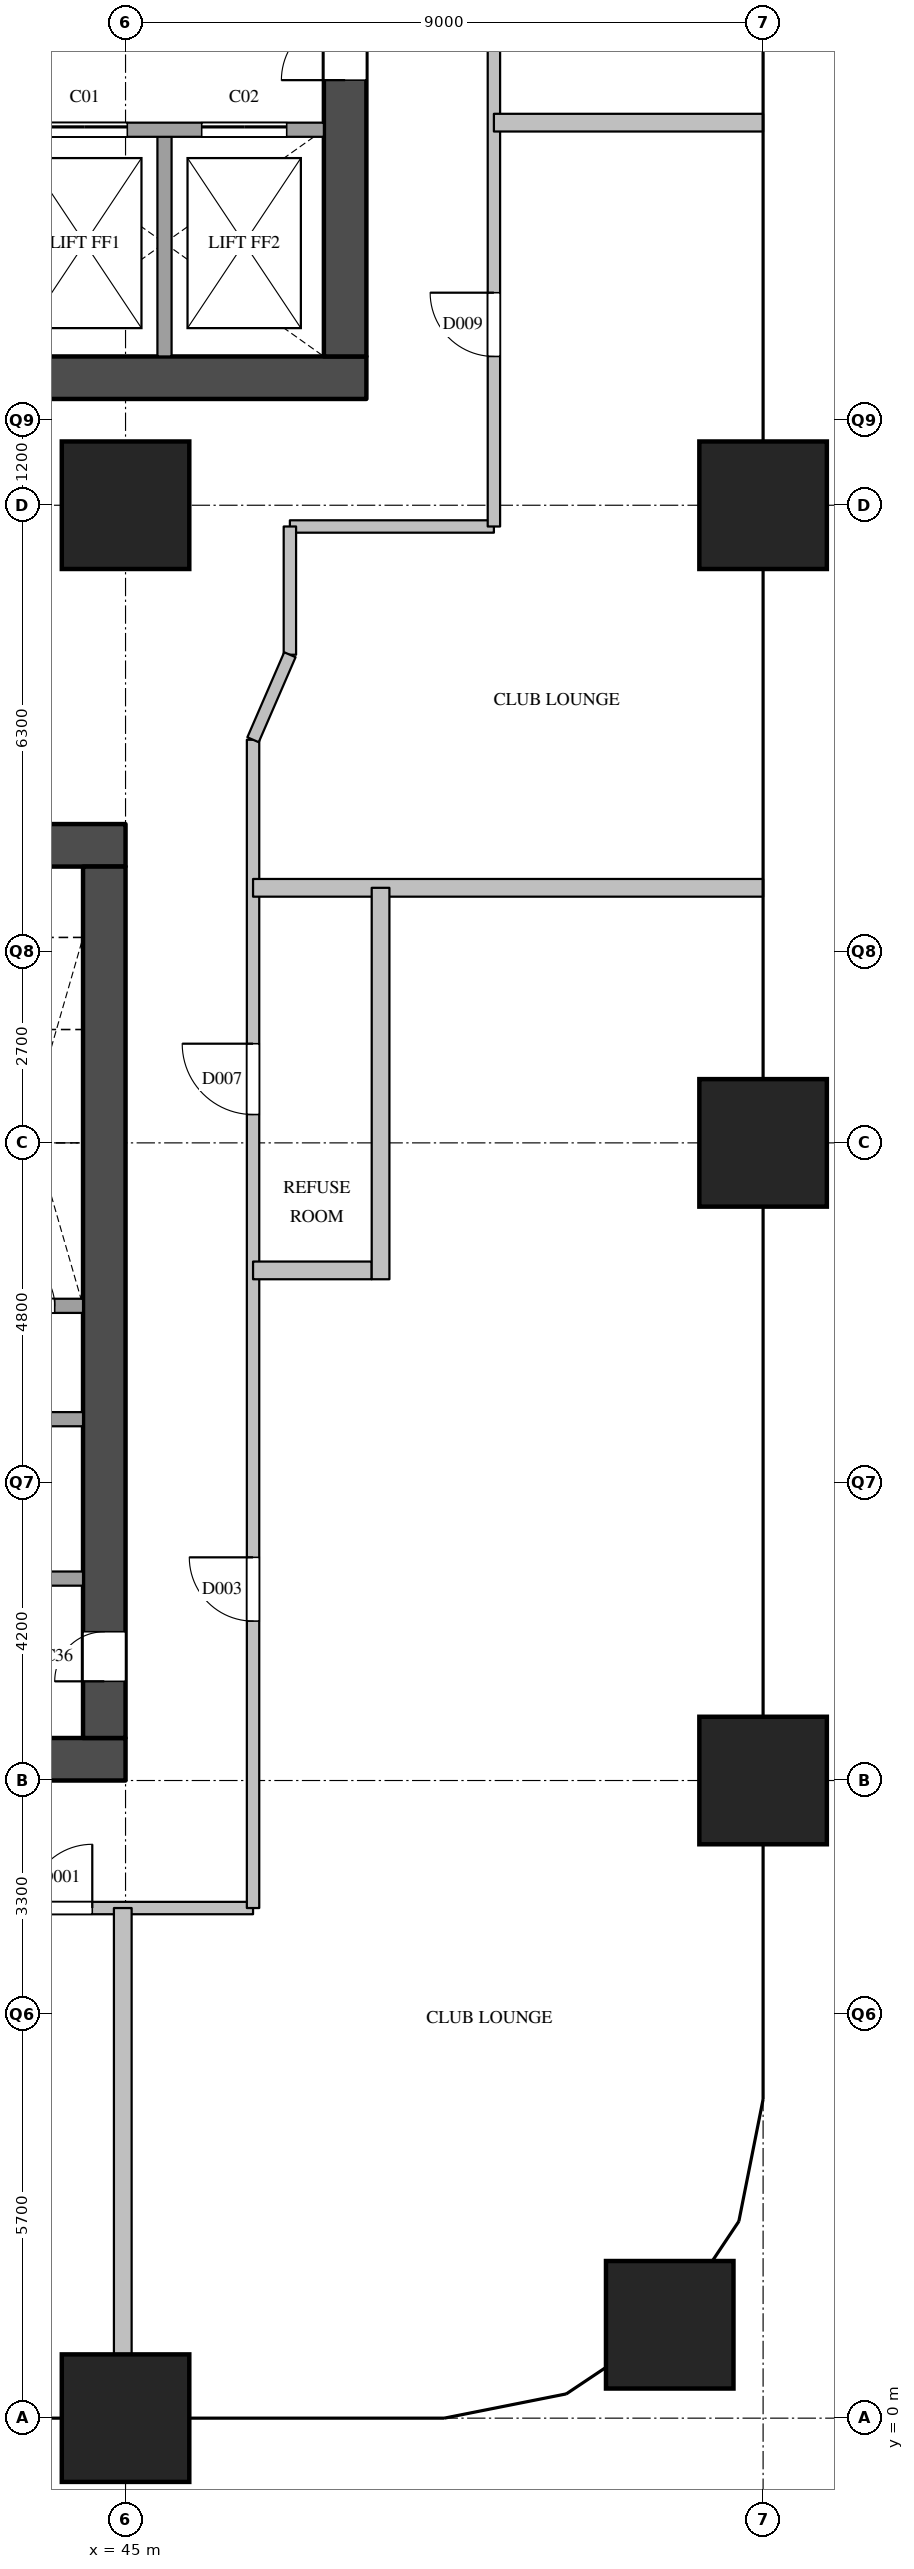
"""IFC4 building model, lengths in metres.
Left out: names, types, materials, properties, quantities, classifications, styles, units other than length and angle.
Written with IfcOpenShell. Run it as: python <this file> out.ifc"""

import sys

from ifc_helpers import new_model, si_unit, direction, frame, frame_2d, origin, origin_2d, place, context, subcontext, project, spatial, rectangle, extrude, element, fill, save


model = new_model("IFC4")
c1 = context("Model", 3, precision=1e-05, world=origin(), true_north=direction((0.0, 1.0)))
c2 = subcontext(c1, "Body", "Model", "MODEL_VIEW")
j1 = project(units=[si_unit("LENGTHUNIT", "METRE"), si_unit("PLANEANGLEUNIT", "RADIAN")], contexts=[c1])
p1 = place(None, origin())
s1 = spatial("IfcSite", under=j1, at=p1, CompositionType="ELEMENT")
p2 = place(p1, origin())
s2 = spatial("IfcBuilding", under=s1, at=p2, CompositionType="ELEMENT")
p3 = place(p2, frame((0.0, 0.0, 89.2)))
s3 = spatial("IfcBuildingStorey", under=s2, at=p3, CompositionType="ELEMENT", Elevation=89.2)
for number, where, z_axis, x_axis in (
    (1, (45.0, 0.0, 0.0), (0.0, 0.0, 1.0), (1.0, 0.0, 0.0)),
    (2, (45.0, 27.0, 0.0), (0.0, 0.0, 1.0), (1.0, 0.0, 0.0)),
    (3, (52.682, 1.318, 0.0), (0.0, 0.0, 1.0), (1.0, 0.0, 0.0)),
    (4, (54.0, 9.0, 0.0), (0.0, 0.0, 1.0), (1.0, 0.0, 0.0)),
    (5, (54.0, 18.0, 0.0), (0.0, 0.0, 1.0), (1.0, 0.0, 0.0)),
    (6, (54.0, 27.0, 0.0), (0.0, 0.0, 1.0), (1.0, 0.0, 0.0)),
):
    element("IfcColumn", number, at=place(p3, frame(where, z_axis=z_axis, x_axis=x_axis)), inside=s3, PredefinedType="COLUMN", context=c2, shape_type="SweptSolid", body=[
        extrude(rectangle(XDim=1.8, YDim=1.8, at=origin_2d()), origin(), (0.0, 0.0, 1.0), 3.8),
    ])
p4 = place(p3, frame((36.0, 28.8, 0.0), z_axis=(0.0, 0.0, 1.0), x_axis=(1.0, 0.0, 0.0)))
e7 = element("IfcWall", 7, at=p4, inside=s3, PredefinedType="SHEAR", context=c2, shape_type="SweptSolid", body=[
    extrude(rectangle(XDim=12.4, YDim=0.6, at=frame_2d((6.2, 0.0))), origin(), (0.0, 0.0, 1.0), 3.5),
])
p5 = place(p3, frame((48.1, 29.1, 0.0), z_axis=(0.0, 0.0, 1.0), x_axis=(0.0, 1.0, 0.0)))
e8 = element("IfcWall", 8, at=p5, inside=s3, PredefinedType="SHEAR", context=c2, shape_type="SweptSolid", body=[
    extrude(rectangle(XDim=20.3, YDim=0.6, at=frame_2d((10.15, 0.0))), origin(), (0.0, 0.0, 1.0), 3.5),
])
p6 = place(p5, frame((12.5, 0.0, 0.0)))
e9 = element("IfcOpeningElement", 9, at=p6, cuts=e8, PredefinedType="OPENING", context=c2, shape_type="SweptSolid", body=[
    extrude(rectangle(XDim=0.7, YDim=2.1, at=frame_2d((0.35, 1.05))), frame((0.0, 0.31, 0.0), z_axis=(0.0, -1.0, 0.0), x_axis=(1.0, 0.0, 0.0)), (0.0, 0.0, 1.0), 0.62),
])
p7 = place(p5, frame((3.9, 0.0, 0.0)))
e10 = element("IfcOpeningElement", 10, at=p7, cuts=e8, PredefinedType="OPENING", context=c2, shape_type="SweptSolid", body=[
    extrude(rectangle(XDim=1.8, YDim=2.1, at=frame_2d((0.9, 1.05))), frame((0.0, 0.31, 0.0), z_axis=(0.0, -1.0, 0.0), x_axis=(1.0, 0.0, 0.0)), (0.0, 0.0, 1.0), 0.62),
])
p8 = place(p3, frame((45.55, 29.1, 0.0), z_axis=(0.0, 0.0, 1.0), x_axis=(0.0, 1.0, 0.0)))
e11 = element("IfcWall", 11, at=p8, inside=s3, PredefinedType="SOLIDWALL", context=c2, shape_type="SweptSolid", body=[
    extrude(rectangle(XDim=3.2, YDim=0.2, at=frame_2d((1.6, 0.0))), origin(), (0.0, 0.0, 1.0), 3.5),
])
p9 = place(p3, frame((36.6, 32.3, 0.0), z_axis=(0.0, 0.0, 1.0), x_axis=(1.0, 0.0, 0.0)))
e12 = element("IfcWall", 12, at=p9, inside=s3, PredefinedType="SOLIDWALL", context=c2, shape_type="SweptSolid", body=[
    extrude(rectangle(XDim=11.2, YDim=0.2, at=frame_2d((5.6, 0.0))), origin(), (0.0, 0.0, 1.0), 3.5),
])
p10 = place(p9, frame((7.225, 0.0, 0.0)))
e13 = element("IfcOpeningElement", 13, at=p10, cuts=e12, PredefinedType="OPENING", context=c2, shape_type="SweptSolid", body=[
    extrude(rectangle(XDim=1.2, YDim=2.1, at=frame_2d((0.6, 1.05))), frame((0.0, 0.11, 0.0), z_axis=(0.0, -1.0, 0.0), x_axis=(1.0, 0.0, 0.0)), (0.0, 0.0, 1.0), 0.22),
])
p11 = place(p9, frame((9.475, 0.0, 0.0)))
e14 = element("IfcOpeningElement", 14, at=p11, cuts=e12, PredefinedType="OPENING", context=c2, shape_type="SweptSolid", body=[
    extrude(rectangle(XDim=1.2, YDim=2.1, at=frame_2d((0.6, 1.05))), frame((0.0, 0.11, 0.0), z_axis=(0.0, -1.0, 0.0), x_axis=(1.0, 0.0, 0.0)), (0.0, 0.0, 1.0), 0.22),
])
for number, where, z_axis, x_axis in (
    (15, (36.0, 9.3, 0.0), (0.0, 0.0, 1.0), (1.0, 0.0, 0.0)),
    (16, (36.0, 22.2, 0.0), (0.0, 0.0, 1.0), (1.0, 0.0, 0.0)),
):
    element("IfcWall", number, at=place(p3, frame(where, z_axis=z_axis, x_axis=x_axis)), inside=s3, PredefinedType="SHEAR", context=c2, shape_type="SweptSolid", body=[
        extrude(rectangle(XDim=9.0, YDim=0.6, at=frame_2d((4.5, 0.0))), origin(), (0.0, 0.0, 1.0), 3.5),
    ])
p12 = place(p3, frame((44.7, 9.6, 0.0), z_axis=(0.0, 0.0, 1.0), x_axis=(0.0, 1.0, 0.0)))
e17 = element("IfcWall", 17, at=p12, inside=s3, PredefinedType="SHEAR", context=c2, shape_type="SweptSolid", body=[
    extrude(rectangle(XDim=12.3, YDim=0.6, at=frame_2d((6.15, 0.0))), origin(), (0.0, 0.0, 1.0), 3.5),
])
p13 = place(p12, frame((0.8, 0.0, 0.0)))
e18 = element("IfcOpeningElement", 18, at=p13, cuts=e17, PredefinedType="OPENING", context=c2, shape_type="SweptSolid", body=[
    extrude(rectangle(XDim=0.7, YDim=2.1, at=frame_2d((0.35, 1.05))), frame((0.0, 0.31, 0.0), z_axis=(0.0, -1.0, 0.0), x_axis=(1.0, 0.0, 0.0)), (0.0, 0.0, 1.0), 0.62),
])
p14 = place(p3, frame((36.6, 11.85, 0.0), z_axis=(0.0, 0.0, 1.0), x_axis=(1.0, 0.0, 0.0)))
e19 = element("IfcWall", 19, at=p14, inside=s3, PredefinedType="SOLIDWALL", context=c2, shape_type="SweptSolid", body=[
    extrude(rectangle(XDim=7.8, YDim=0.2, at=frame_2d((3.9, 0.0))), origin(), (0.0, 0.0, 1.0), 3.5),
])
p15 = place(p3, frame((42.6, 14.1, 0.0), z_axis=(0.0, 0.0, 1.0), x_axis=(1.0, 0.0, 0.0)))
e20 = element("IfcWall", 20, at=p15, inside=s3, PredefinedType="SOLIDWALL", context=c2, shape_type="SweptSolid", body=[
    extrude(rectangle(XDim=1.8, YDim=0.2, at=frame_2d((0.9, 0.0))), origin(), (0.0, 0.0, 1.0), 3.5),
])
p16 = place(p15, frame((0.55, 0.0, 0.0)))
e21 = element("IfcOpeningElement", 21, at=p16, cuts=e20, PredefinedType="OPENING", context=c2, shape_type="SweptSolid", body=[
    extrude(rectangle(XDim=0.7, YDim=2.1, at=frame_2d((0.35, 1.05))), frame((0.0, 0.11, 0.0), z_axis=(0.0, -1.0, 0.0), x_axis=(1.0, 0.0, 0.0)), (0.0, 0.0, 1.0), 0.22),
])
p17 = place(p3, frame((42.9, 15.7, 0.0), z_axis=(0.0, 0.0, 1.0), x_axis=(1.0, 0.0, 0.0)))
e22 = element("IfcWall", 22, at=p17, inside=s3, PredefinedType="SOLIDWALL", context=c2, shape_type="SweptSolid", body=[
    extrude(rectangle(XDim=1.5, YDim=0.2, at=frame_2d((0.75, 0.0))), origin(), (0.0, 0.0, 1.0), 3.5),
])
p18 = place(p17, frame((0.4, 0.0, 0.0)))
e23 = element("IfcOpeningElement", 23, at=p18, cuts=e22, PredefinedType="OPENING", context=c2, shape_type="SweptSolid", body=[
    extrude(rectangle(XDim=0.7, YDim=2.1, at=frame_2d((0.35, 1.05))), frame((0.0, 0.11, 0.0), z_axis=(0.0, -1.0, 0.0), x_axis=(1.0, 0.0, 0.0)), (0.0, 0.0, 1.0), 0.22),
])
p19 = place(p3, frame((34.2, 7.2, 0.0), z_axis=(0.0, 0.0, 1.0), x_axis=(1.0, 0.0, 0.0)))
e24 = element("IfcWall", 24, at=p19, inside=s3, PredefinedType="PARTITIONING", context=c2, shape_type="SweptSolid", body=[
    extrude(rectangle(XDim=12.6, YDim=0.175, at=frame_2d((6.3, 0.0))), origin(), (0.0, 0.0, 1.0), 3.5),
])
p20 = place(p19, frame((9.43, 0.0, 0.0)))
e25 = element("IfcOpeningElement", 25, at=p20, cuts=e24, PredefinedType="OPENING", context=c2, shape_type="SweptSolid", body=[
    extrude(rectangle(XDim=0.9, YDim=2.1, at=frame_2d((0.45, 1.05))), frame((0.0, 0.097, 0.0), z_axis=(0.0, -1.0, 0.0), x_axis=(1.0, 0.0, 0.0)), (0.0, 0.0, 1.0), 0.195),
])
p21 = place(p3, frame((47.32, 26.7, 0.0), z_axis=(0.0, 0.0, 1.0), x_axis=(1.0, 0.0, 0.0)))
e26 = element("IfcWall", 26, at=p21, inside=s3, PredefinedType="PARTITIONING", context=c2, shape_type="SweptSolid", body=[
    extrude(rectangle(XDim=2.88, YDim=0.175, at=frame_2d((1.44, 0.0))), origin(), (0.0, 0.0, 1.0), 2.5),
])
p22 = place(p3, frame((46.8, 7.2, 0.0), z_axis=(0.0, 0.0, 1.0), x_axis=(0.0, 1.0, 0.0)))
e27 = element("IfcWall", 27, at=p22, inside=s3, PredefinedType="PARTITIONING", context=c2, shape_type="SweptSolid", body=[
    extrude(rectangle(XDim=16.49, YDim=0.175, at=frame_2d((8.245, 0.0))), origin(), (0.0, 0.0, 1.0), 3.5),
])
p23 = place(p22, frame((4.05, 0.0, 0.0)))
e28 = element("IfcOpeningElement", 28, at=p23, cuts=e27, PredefinedType="OPENING", context=c2, shape_type="SweptSolid", body=[
    extrude(rectangle(XDim=0.9, YDim=2.1, at=frame_2d((0.45, 1.05))), frame((0.0, 0.097, 0.0), z_axis=(0.0, -1.0, 0.0), x_axis=(1.0, 0.0, 0.0)), (0.0, 0.0, 1.0), 0.195),
])
p24 = place(p22, frame((11.2, 0.0, 0.0)))
e29 = element("IfcOpeningElement", 29, at=p24, cuts=e27, PredefinedType="OPENING", context=c2, shape_type="SweptSolid", body=[
    extrude(rectangle(XDim=1.0, YDim=2.1, at=frame_2d((0.5, 1.05))), frame((0.0, 0.097, 0.0), z_axis=(0.0, -1.0, 0.0), x_axis=(1.0, 0.0, 0.0)), (0.0, 0.0, 1.0), 0.195),
])
p25 = place(p3, frame((47.32, 24.89, 0.0), z_axis=(0.0, 0.0, 1.0), x_axis=(0.0, 1.0, 0.0)))
e30 = element("IfcWall", 30, at=p25, inside=s3, PredefinedType="PARTITIONING", context=c2, shape_type="SweptSolid", body=[
    extrude(rectangle(XDim=1.81, YDim=0.175, at=frame_2d((0.905, 0.0))), origin(), (0.0, 0.0, 1.0), 2.5),
])
p26 = place(p3, frame((50.2, 26.7, 0.0), z_axis=(0.0, 0.0, 1.0), x_axis=(0.0, 1.0, 0.0)))
e31 = element("IfcWall", 31, at=p26, inside=s3, PredefinedType="PARTITIONING", context=c2, shape_type="SweptSolid", body=[
    extrude(rectangle(XDim=25.1, YDim=0.175, at=frame_2d((12.55, 0.0))), origin(), (0.0, 0.0, 1.0), 2.5),
])
p27 = place(p26, frame((2.4, 0.0, 0.0)))
e32 = element("IfcOpeningElement", 32, at=p27, cuts=e31, PredefinedType="OPENING", context=c2, shape_type="SweptSolid", body=[
    extrude(rectangle(XDim=0.9, YDim=2.1, at=frame_2d((0.45, 1.05))), frame((0.0, 0.097, 0.0), z_axis=(0.0, -1.0, 0.0), x_axis=(1.0, 0.0, 0.0)), (0.0, 0.0, 1.0), 0.195),
])
p28 = place(p26, frame((7.9, 0.0, 0.0)))
e33 = element("IfcOpeningElement", 33, at=p28, cuts=e31, PredefinedType="OPENING", context=c2, shape_type="SweptSolid", body=[
    extrude(rectangle(XDim=1.0, YDim=2.1, at=frame_2d((0.5, 1.05))), frame((0.0, 0.097, 0.0), z_axis=(0.0, -1.0, 0.0), x_axis=(1.0, 0.0, 0.0)), (0.0, 0.0, 1.0), 0.195),
])
p29 = place(p26, frame((16.05, 0.0, 0.0)))
e34 = element("IfcOpeningElement", 34, at=p29, cuts=e31, PredefinedType="OPENING", context=c2, shape_type="SweptSolid", body=[
    extrude(rectangle(XDim=0.9, YDim=2.1, at=frame_2d((0.45, 1.05))), frame((0.0, 0.097, 0.0), z_axis=(0.0, -1.0, 0.0), x_axis=(1.0, 0.0, 0.0)), (0.0, 0.0, 1.0), 0.195),
])
p30 = place(p3, frame((46.8, 16.2, 0.0), z_axis=(0.0, 0.0, 1.0), x_axis=(1.0, 0.0, 0.0)))
e35 = element("IfcWall", 35, at=p30, inside=s3, PredefinedType="PARTITIONING", context=c2, shape_type="SweptSolid", body=[
    extrude(rectangle(XDim=1.675, YDim=0.25, at=frame_2d((0.837, 0.0))), origin(), (0.0, 0.0, 1.0), 3.5),
])
p31 = place(p3, frame((46.8, 21.6, 0.0), z_axis=(0.0, 0.0, 1.0), x_axis=(1.0, 0.0, 0.0)))
e36 = element("IfcWall", 36, at=p31, inside=s3, PredefinedType="PARTITIONING", context=c2, shape_type="SweptSolid", body=[
    extrude(rectangle(XDim=7.2, YDim=0.25, at=frame_2d((3.6, 0.0))), origin(), (0.0, 0.0, 1.0), 2.5),
])
p32 = place(p3, frame((50.2, 32.4, 0.0), z_axis=(0.0, 0.0, 1.0), x_axis=(1.0, 0.0, 0.0)))
e37 = element("IfcWall", 37, at=p32, inside=s3, PredefinedType="PARTITIONING", context=c2, shape_type="SweptSolid", body=[
    extrude(rectangle(XDim=3.8, YDim=0.25, at=frame_2d((1.9, 0.0))), origin(), (0.0, 0.0, 1.0), 2.5),
])
p33 = place(p3, frame((44.961, 0.0, 0.0), z_axis=(0.0, 0.0, 1.0), x_axis=(0.0, 1.0, 0.0)))
e38 = element("IfcWall", 38, at=p33, inside=s3, PredefinedType="PARTITIONING", context=c2, shape_type="SweptSolid", body=[
    extrude(rectangle(XDim=7.2, YDim=0.25, at=frame_2d((3.6, 0.0))), origin(), (0.0, 0.0, 1.0), 3.5),
])
p34 = place(p3, frame((48.6, 16.075, 0.0), z_axis=(0.0, 0.0, 1.0), x_axis=(0.0, 1.0, 0.0)))
e39 = element("IfcWall", 39, at=p34, inside=s3, PredefinedType="PARTITIONING", context=c2, shape_type="SweptSolid", body=[
    extrude(rectangle(XDim=5.525, YDim=0.25, at=frame_2d((2.763, 0.0))), origin(), (0.0, 0.0, 1.0), 3.5),
])
p35 = place(p3, frame((47.32, 24.89, 0.0), z_axis=(0.0, 0.0, 1.0), x_axis=(-0.397633632391, -0.917544273804, 0.0)))
e40 = element("IfcWall", 40, at=p35, inside=s3, PredefinedType="PARTITIONING", context=c2, shape_type="SweptSolid", body=[
    extrude(rectangle(XDim=1.308, YDim=0.175, at=frame_2d((0.654, 0.0))), origin(), (0.0, 0.0, 1.0), 3.5),
])
p36 = place(p10, origin())
e41 = element("IfcDoor", 41, at=p36, inside=s3, OperationType="SLIDING_TO_LEFT", PredefinedType="DOOR", context=c2, shape_type="SweptSolid", body=[
    extrude(rectangle(XDim=1.2, YDim=2.1, at=frame_2d((0.6, 1.05))), frame((0.0, 0.025, 0.0), z_axis=(0.0, -1.0, 0.0), x_axis=(1.0, 0.0, 0.0)), (0.0, 0.0, 1.0), 0.05),
])
fill(e13, e41)
p37 = place(p11, origin())
e42 = element("IfcDoor", 42, at=p37, inside=s3, OperationType="SLIDING_TO_LEFT", PredefinedType="DOOR", context=c2, shape_type="SweptSolid", body=[
    extrude(rectangle(XDim=1.2, YDim=2.1, at=frame_2d((0.6, 1.05))), frame((0.0, 0.025, 0.0), z_axis=(0.0, -1.0, 0.0), x_axis=(1.0, 0.0, 0.0)), (0.0, 0.0, 1.0), 0.05),
])
fill(e14, e42)
p38 = place(p7, origin())
e43 = element("IfcDoor", 43, at=p38, inside=s3, OperationType="DOUBLE_DOOR_SINGLE_SWING", PredefinedType="DOOR", context=c2, shape_type="SweptSolid", body=[
    extrude(rectangle(XDim=1.8, YDim=2.1, at=frame_2d((0.9, 1.05))), frame((0.0, 0.025, 0.0), z_axis=(0.0, -1.0, 0.0), x_axis=(1.0, 0.0, 0.0)), (0.0, 0.0, 1.0), 0.05),
])
fill(e10, e43)
p39 = place(p18, origin())
e44 = element("IfcDoor", 44, at=p39, inside=s3, OperationType="SINGLE_SWING_LEFT", PredefinedType="DOOR", context=c2, shape_type="SweptSolid", body=[
    extrude(rectangle(XDim=0.7, YDim=2.1, at=frame_2d((0.35, 1.05))), frame((0.0, 0.025, 0.0), z_axis=(0.0, -1.0, 0.0), x_axis=(1.0, 0.0, 0.0)), (0.0, 0.0, 1.0), 0.05),
])
fill(e23, e44)
p40 = place(p13, origin())
e45 = element("IfcDoor", 45, at=p40, inside=s3, OperationType="SINGLE_SWING_LEFT", PredefinedType="DOOR", context=c2, shape_type="SweptSolid", body=[
    extrude(rectangle(XDim=0.7, YDim=2.1, at=frame_2d((0.35, 1.05))), frame((0.0, 0.025, 0.0), z_axis=(0.0, -1.0, 0.0), x_axis=(1.0, 0.0, 0.0)), (0.0, 0.0, 1.0), 0.05),
])
fill(e18, e45)
p41 = place(p20, origin())
e46 = element("IfcDoor", 46, at=p41, inside=s3, OperationType="SINGLE_SWING_RIGHT", PredefinedType="DOOR", context=c2, shape_type="SweptSolid", body=[
    extrude(rectangle(XDim=0.9, YDim=2.1, at=frame_2d((0.45, 1.05))), frame((0.0, 0.025, 0.0), z_axis=(0.0, -1.0, 0.0), x_axis=(1.0, 0.0, 0.0)), (0.0, 0.0, 1.0), 0.05),
])
fill(e25, e46)
p42 = place(p23, origin())
e47 = element("IfcDoor", 47, at=p42, inside=s3, OperationType="SINGLE_SWING_RIGHT", PredefinedType="DOOR", context=c2, shape_type="SweptSolid", body=[
    extrude(rectangle(XDim=0.9, YDim=2.1, at=frame_2d((0.45, 1.05))), frame((0.0, 0.025, 0.0), z_axis=(0.0, -1.0, 0.0), x_axis=(1.0, 0.0, 0.0)), (0.0, 0.0, 1.0), 0.05),
])
fill(e28, e47)
p43 = place(p24, origin())
e48 = element("IfcDoor", 48, at=p43, inside=s3, OperationType="SINGLE_SWING_RIGHT", PredefinedType="DOOR", context=c2, shape_type="SweptSolid", body=[
    extrude(rectangle(XDim=1.0, YDim=2.1, at=frame_2d((0.5, 1.05))), frame((0.0, 0.025, 0.0), z_axis=(0.0, -1.0, 0.0), x_axis=(1.0, 0.0, 0.0)), (0.0, 0.0, 1.0), 0.05),
])
fill(e29, e48)
p44 = place(p27, origin())
e49 = element("IfcDoor", 49, at=p44, inside=s3, OperationType="SINGLE_SWING_RIGHT", PredefinedType="DOOR", context=c2, shape_type="SweptSolid", body=[
    extrude(rectangle(XDim=0.9, YDim=2.1, at=frame_2d((0.45, 1.05))), frame((0.0, 0.025, 0.0), z_axis=(0.0, -1.0, 0.0), x_axis=(1.0, 0.0, 0.0)), (0.0, 0.0, 1.0), 0.05),
])
fill(e32, e49)
save(model, sys.argv[1])
